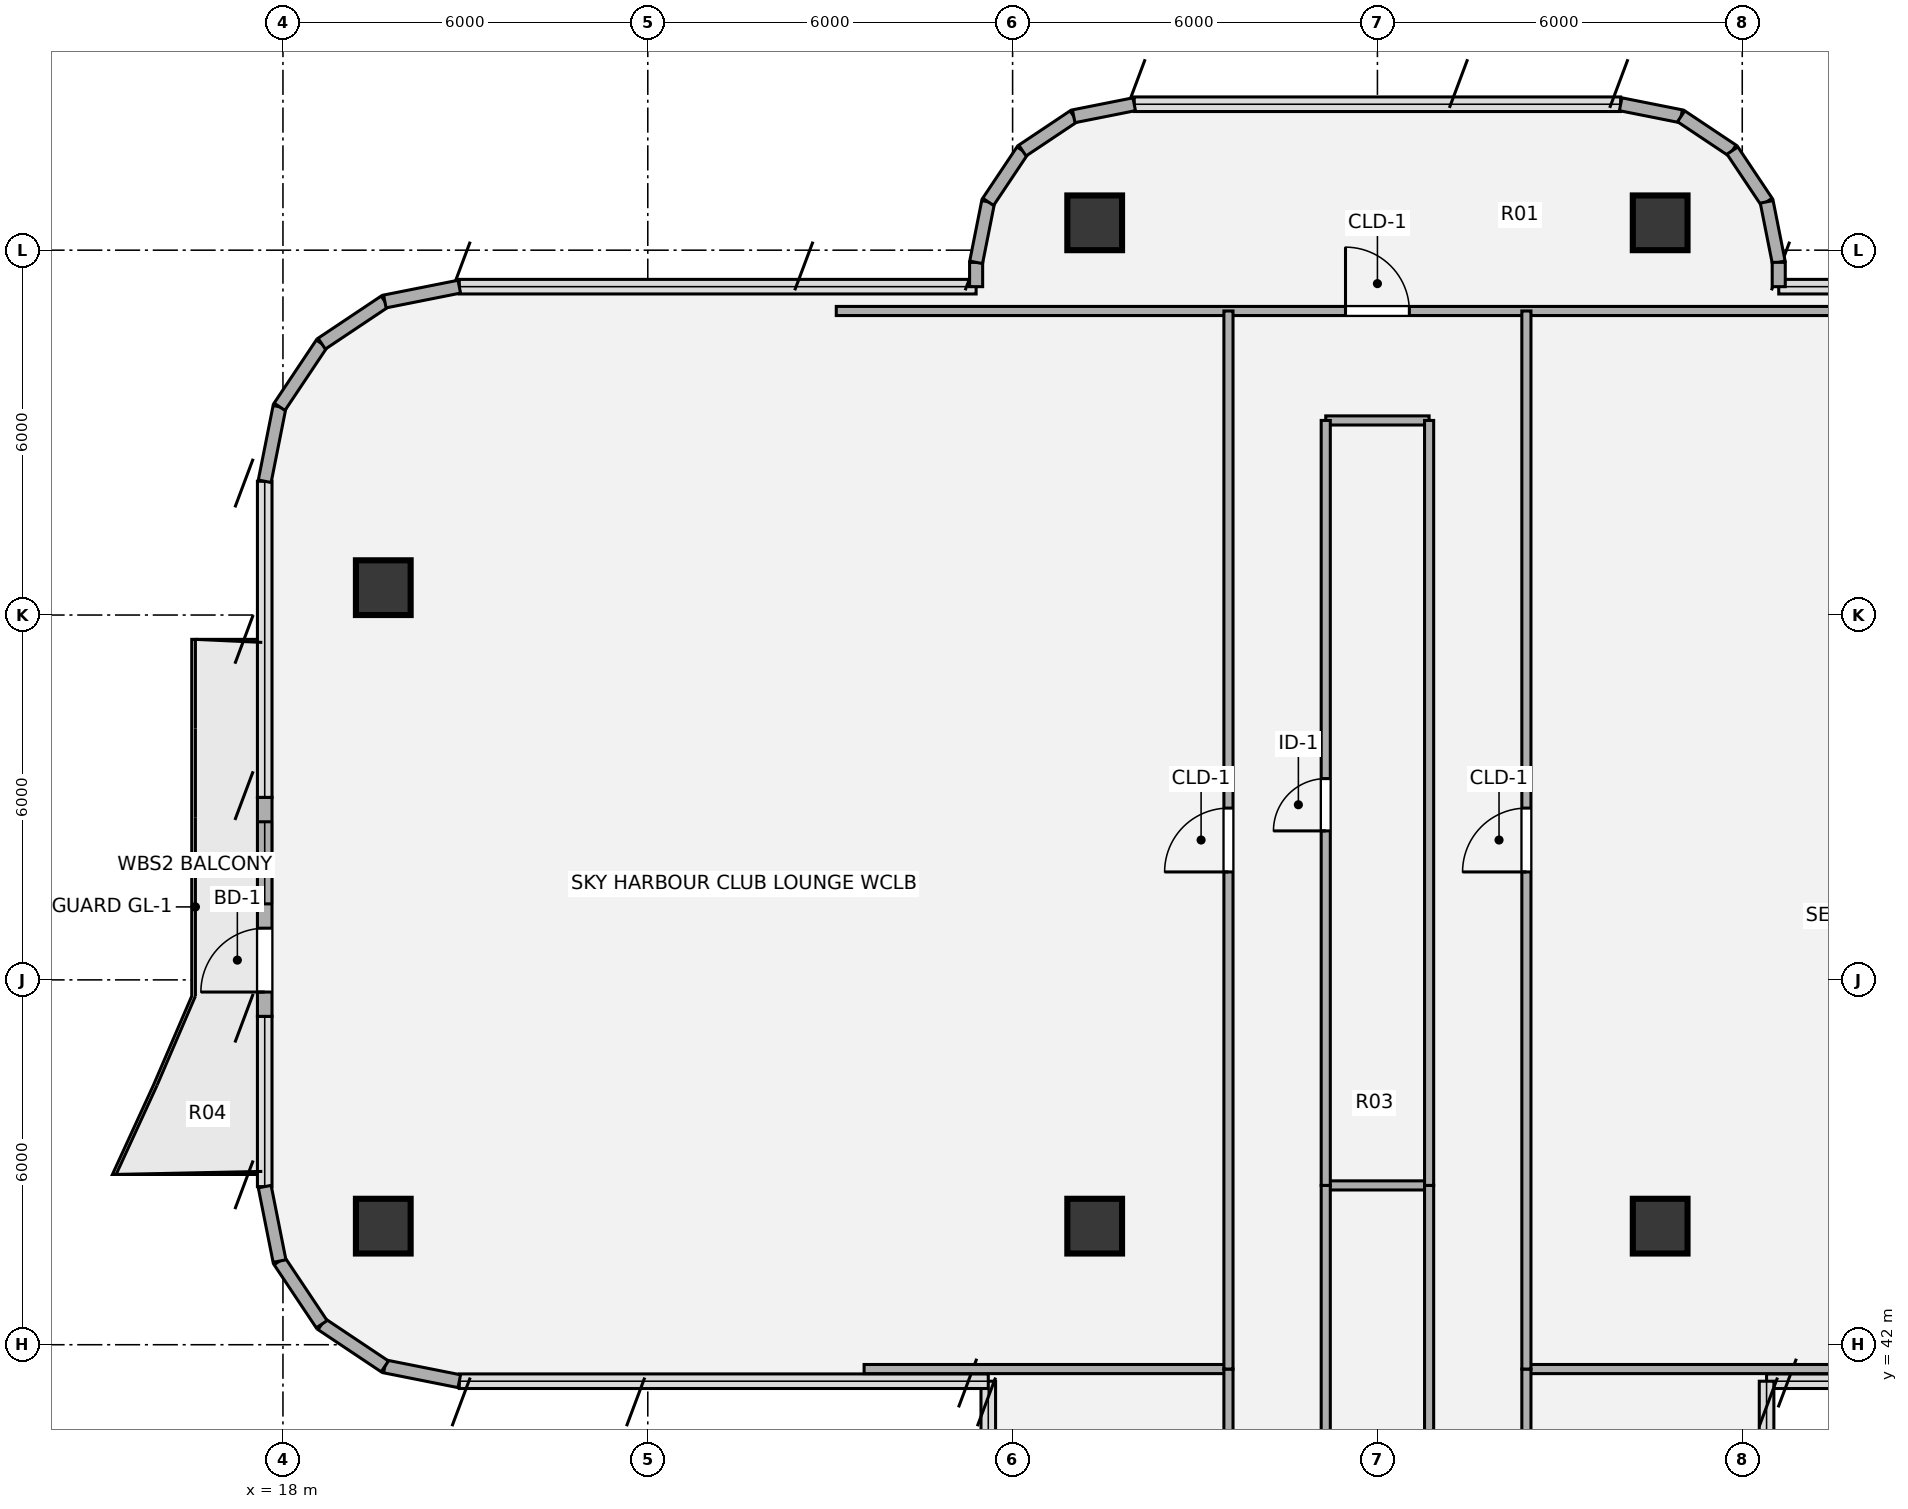
"""IFC4 building model, lengths in metres.
Left out: names, types, materials, properties, quantities, classifications, styles, units other than length and angle.
Written with IfcOpenShell. Run it as: python <this file> out.ifc"""

import sys

from ifc_helpers import new_model, si_unit, direction, frame, frame_2d, origin, origin_2d, place, context, subcontext, project, spatial, rectangle, hollow_circle, extrude, source, transform, mapped, element, fill, save


model = new_model("IFC4")
c1 = context("Model", 3, precision=1e-05, world=origin(), true_north=direction((0.0, 1.0)))
c2 = subcontext(c1, "Body", "Model", "MODEL_VIEW")
j1 = project(units=[si_unit("LENGTHUNIT", "METRE"), si_unit("PLANEANGLEUNIT", "RADIAN")], contexts=[c1])
p1 = place(None, origin())
s1 = spatial("IfcSite", under=j1, at=p1, CompositionType="ELEMENT")
p2 = place(p1, origin())
s2 = spatial("IfcBuilding", under=s1, at=p2, CompositionType="ELEMENT")
p3 = place(p2, frame((0.0, 0.0, 257.04)))
s3 = spatial("IfcBuildingStorey", under=s2, at=p3, CompositionType="ELEMENT", Elevation=257.04)
m1 = source(origin(), c2, "Body", "SweptSolid", [
    extrude(hollow_circle(Radius=0.45, WallThickness=0.032, at=origin_2d()), origin(), (0.0, 0.0, 1.0), 3.78),
])
for number, where, z_axis, x_axis in (
    (1, (19.65, 43.95, 0.0), (0.0, 0.0, 1.0), (1.0, 0.0, 0.0)),
    (2, (19.65, 54.45, 0.0), (0.0, 0.0, 1.0), (1.0, 0.0, 0.0)),
    (3, (31.35, 43.95, 0.0), (0.0, 0.0, 1.0), (1.0, 0.0, 0.0)),
    (4, (40.65, 43.95, 0.0), (0.0, 0.0, 1.0), (1.0, 0.0, 0.0)),
    (5, (31.35, 60.45, 0.0), (0.0, 0.0, 1.0), (1.0, 0.0, 0.0)),
    (6, (40.65, 60.45, 0.0), (0.0, 0.0, 1.0), (1.0, 0.0, 0.0)),
):
    element("IfcColumn", number, at=place(p3, frame(where, z_axis=z_axis, x_axis=x_axis)), inside=s3, PredefinedType="COLUMN", context=c2, shape_type="MappedRepresentation", body=[
        mapped(m1, transform((0.0, 0.0, 0.0), x_axis=(1.0, 0.0, 0.0), y_axis=(0.0, 1.0, 0.0), z_axis=(0.0, 0.0, 1.0), scale=1.0)),
    ])
for number, where, z_axis, x_axis in (
    (7, (20.9, 41.4, 0.0), (0.0, 0.0, 1.0), (-0.981, 0.195, 0.0)),
    (8, (19.675, 41.644, 0.0), (0.0, 0.0, 1.0), (-0.831, 0.556, 0.0)),
    (9, (18.637, 42.337, 0.0), (0.0, 0.0, 1.0), (-0.556, 0.831, 0.0)),
    (10, (17.944, 43.375, 0.0), (0.0, 0.0, 1.0), (-0.195, 0.981, 0.0)),
):
    element("IfcWall", number, at=place(p3, frame(where, z_axis=z_axis, x_axis=x_axis)), inside=s3, PredefinedType="SOLIDWALL", context=c2, shape_type="SweptSolid", body=[
        extrude(rectangle(XDim=1.249, YDim=0.215, at=frame_2d((0.624, 0.0))), origin(), (0.0, 0.0, 1.0), 3.53),
    ])
p4 = place(p3, frame((17.7, 47.4, 0.0), z_axis=(0.0, 0.0, 1.0), x_axis=(0.0, 1.0, 0.0)))
e11 = element("IfcWall", 11, at=p4, inside=s3, PredefinedType="SOLIDWALL", context=c2, shape_type="SweptSolid", body=[
    extrude(rectangle(XDim=3.6, YDim=0.24, at=frame_2d((1.8, 0.0))), origin(), (0.0, 0.0, 1.0), 3.53),
])
p5 = place(p4, frame((0.4, 0.0, 0.0)))
e12 = element("IfcOpeningElement", 12, at=p5, cuts=e11, PredefinedType="OPENING", context=c2, shape_type="SweptSolid", body=[
    extrude(rectangle(XDim=1.05, YDim=2.15, at=origin_2d()), frame((0.525, 0.13, 1.075), z_axis=(0.0, -1.0, 0.0), x_axis=(1.0, 0.0, 0.0)), (0.0, 0.0, 1.0), 0.26),
])
p6 = place(p4, frame((1.85, 0.0, 0.85)))
e13 = element("IfcOpeningElement", 13, at=p6, cuts=e11, PredefinedType="OPENING", context=c2, shape_type="SweptSolid", body=[
    extrude(rectangle(XDim=1.35, YDim=1.35, at=origin_2d()), frame((0.675, 0.13, 0.675), z_axis=(0.0, -1.0, 0.0), x_axis=(1.0, 0.0, 0.0)), (0.0, 0.0, 1.0), 0.26),
])
for number, where, z_axis, x_axis in (
    (14, (17.7, 56.2, 0.0), (0.0, 0.0, 1.0), (0.195, 0.981, 0.0)),
    (15, (17.944, 57.425, 0.0), (0.0, 0.0, 1.0), (0.556, 0.831, 0.0)),
    (16, (18.637, 58.463, 0.0), (0.0, 0.0, 1.0), (0.831, 0.556, 0.0)),
    (17, (19.675, 59.156, 0.0), (0.0, 0.0, 1.0), (0.981, 0.195, 0.0)),
):
    element("IfcWall", number, at=place(p3, frame(where, z_axis=z_axis, x_axis=x_axis)), inside=s3, PredefinedType="SOLIDWALL", context=c2, shape_type="SweptSolid", body=[
        extrude(rectangle(XDim=1.249, YDim=0.215, at=frame_2d((0.624, 0.0))), origin(), (0.0, 0.0, 1.0), 3.53),
    ])
p7 = place(p3, frame((29.4, 59.4, 0.0), z_axis=(0.0, 0.0, 1.0), x_axis=(0.0, 1.0, 0.0)))
e18 = element("IfcWall", 18, at=p7, inside=s3, PredefinedType="SOLIDWALL", context=c2, shape_type="SweptSolid", body=[
    extrude(rectangle(XDim=0.4, YDim=0.215, at=frame_2d((0.2, 0.0))), origin(), (0.0, 0.0, 1.0), 3.53),
])
p8 = place(p3, frame((29.4, 59.8, 0.0), z_axis=(0.0, 0.0, 1.0), x_axis=(0.195190360752, 0.980765376158, 0.0)))
e19 = element("IfcWall", 19, at=p8, inside=s3, PredefinedType="SOLIDWALL", context=c2, shape_type="SweptSolid", body=[
    extrude(rectangle(XDim=1.014, YDim=0.215, at=frame_2d((0.507, 0.0))), origin(), (0.0, 0.0, 1.0), 3.53),
])
p9 = place(p3, frame((29.598, 60.795, 0.0), z_axis=(0.0, 0.0, 1.0), x_axis=(0.555643898837, 0.831420385657, 0.0)))
e20 = element("IfcWall", 20, at=p9, inside=s3, PredefinedType="SOLIDWALL", context=c2, shape_type="SweptSolid", body=[
    extrude(rectangle(XDim=1.015, YDim=0.215, at=frame_2d((0.507, 0.0))), origin(), (0.0, 0.0, 1.0), 3.53),
])
p10 = place(p3, frame((30.162, 61.638, 0.0), z_axis=(0.0, 0.0, 1.0), x_axis=(0.831346067305, 0.555755086685, 0.0)))
e21 = element("IfcWall", 21, at=p10, inside=s3, PredefinedType="SOLIDWALL", context=c2, shape_type="SweptSolid", body=[
    extrude(rectangle(XDim=1.014, YDim=0.215, at=frame_2d((0.507, 0.0))), origin(), (0.0, 0.0, 1.0), 3.53),
])
for number, where, z_axis, x_axis in (
    (22, (31.005, 62.202, 0.0), (0.0, 0.0, 1.0), (0.981, 0.195, 0.0)),
    (23, (40.0, 62.4, 0.0), (0.0, 0.0, 1.0), (0.981, -0.195, 0.0)),
):
    element("IfcWall", number, at=place(p3, frame(where, z_axis=z_axis, x_axis=x_axis)), inside=s3, PredefinedType="SOLIDWALL", context=c2, shape_type="SweptSolid", body=[
        extrude(rectangle(XDim=1.015, YDim=0.215, at=frame_2d((0.507, 0.0))), origin(), (0.0, 0.0, 1.0), 3.53),
    ])
p11 = place(p3, frame((40.995, 62.202, 0.0), z_axis=(0.0, 0.0, 1.0), x_axis=(0.831346067305, -0.555755086685, 0.0)))
e24 = element("IfcWall", 24, at=p11, inside=s3, PredefinedType="SOLIDWALL", context=c2, shape_type="SweptSolid", body=[
    extrude(rectangle(XDim=1.014, YDim=0.215, at=frame_2d((0.507, 0.0))), origin(), (0.0, 0.0, 1.0), 3.53),
])
p12 = place(p3, frame((41.838, 61.638, 0.0), z_axis=(0.0, 0.0, 1.0), x_axis=(0.555643898837, -0.831420385657, 0.0)))
e25 = element("IfcWall", 25, at=p12, inside=s3, PredefinedType="SOLIDWALL", context=c2, shape_type="SweptSolid", body=[
    extrude(rectangle(XDim=1.015, YDim=0.215, at=frame_2d((0.507, 0.0))), origin(), (0.0, 0.0, 1.0), 3.53),
])
p13 = place(p3, frame((42.402, 60.795, 0.0), z_axis=(0.0, 0.0, 1.0), x_axis=(0.195190360752, -0.980765376158, 0.0)))
e26 = element("IfcWall", 26, at=p13, inside=s3, PredefinedType="SOLIDWALL", context=c2, shape_type="SweptSolid", body=[
    extrude(rectangle(XDim=1.014, YDim=0.215, at=frame_2d((0.507, 0.0))), origin(), (0.0, 0.0, 1.0), 3.53),
])
p14 = place(p3, frame((42.6, 59.8, 0.0), z_axis=(0.0, 0.0, 1.0), x_axis=(0.0, -1.0, 0.0)))
e27 = element("IfcWall", 27, at=p14, inside=s3, PredefinedType="SOLIDWALL", context=c2, shape_type="SweptSolid", body=[
    extrude(rectangle(XDim=0.4, YDim=0.215, at=frame_2d((0.2, 0.0))), origin(), (0.0, 0.0, 1.0), 3.53),
])
p15 = place(p3, frame((27.558, 41.6, 0.0), z_axis=(0.0, 0.0, 1.0), x_axis=(1.0, 0.0, 0.0)))
e28 = element("IfcWall", 28, at=p15, inside=s3, PredefinedType="PARTITIONING", context=c2, shape_type="SweptSolid", body=[
    extrude(rectangle(XDim=5.992, YDim=0.15, at=frame_2d((2.996, 0.0))), origin(), (0.0, 0.0, 1.0), 3.5),
])
p16 = place(p3, frame((38.45, 41.6, 0.0), z_axis=(0.0, 0.0, 1.0), x_axis=(1.0, 0.0, 0.0)))
e29 = element("IfcWall", 29, at=p16, inside=s3, PredefinedType="PARTITIONING", context=c2, shape_type="SweptSolid", body=[
    extrude(rectangle(XDim=5.993, YDim=0.15, at=frame_2d((2.997, 0.0))), origin(), (0.0, 0.0, 1.0), 3.5),
])
p17 = place(p3, frame((35.15, 44.62, 0.0), z_axis=(0.0, 0.0, 1.0), x_axis=(1.0, 0.0, 0.0)))
e30 = element("IfcWall", 30, at=p17, inside=s3, PredefinedType="PARTITIONING", context=c2, shape_type="SweptSolid", body=[
    extrude(rectangle(XDim=1.7, YDim=0.15, at=frame_2d((0.85, 0.0))), origin(), (0.0, 0.0, 1.0), 3.259),
])
p18 = place(p3, frame((35.15, 57.2, 0.0), z_axis=(0.0, 0.0, 1.0), x_axis=(1.0, 0.0, 0.0)))
e31 = element("IfcWall", 31, at=p18, inside=s3, PredefinedType="PARTITIONING", context=c2, shape_type="SweptSolid", body=[
    extrude(rectangle(XDim=1.7, YDim=0.15, at=frame_2d((0.85, 0.0))), origin(), (0.0, 0.0, 1.0), 3.308),
])
p19 = place(p3, frame((27.1, 59.0, 0.0), z_axis=(0.0, 0.0, 1.0), x_axis=(1.0, 0.0, 0.0)))
e32 = element("IfcWall", 32, at=p19, inside=s3, PredefinedType="PARTITIONING", context=c2, shape_type="SweptSolid", body=[
    extrude(rectangle(XDim=17.8, YDim=0.15, at=frame_2d((8.9, 0.0))), origin(), (0.0, 0.0, 1.0), 3.308),
])
p20 = place(p19, frame((8.375, 0.0, 0.0)))
e33 = element("IfcOpeningElement", 33, at=p20, cuts=e32, PredefinedType="OPENING", context=c2, shape_type="SweptSolid", body=[
    extrude(rectangle(XDim=1.05, YDim=2.1, at=origin_2d()), frame((0.525, 0.085, 1.05), z_axis=(0.0, -1.0, 0.0), x_axis=(1.0, 0.0, 0.0)), (0.0, 0.0, 1.0), 0.17),
])
p21 = place(p3, frame((33.55, 22.8, 0.0), z_axis=(0.0, 0.0, 1.0), x_axis=(0.0, 1.0, 0.0)))
e34 = element("IfcWall", 34, at=p21, inside=s3, PredefinedType="PARTITIONING", context=c2, shape_type="SweptSolid", body=[
    extrude(rectangle(XDim=18.8, YDim=0.15, at=frame_2d((9.4, 0.0))), origin(), (0.0, 0.0, 1.0), 3.5),
])
p22 = place(p21, frame((8.84, 0.0, 0.0)))
e35 = element("IfcOpeningElement", 35, at=p22, cuts=e34, PredefinedType="OPENING", context=c2, shape_type="SweptSolid", body=[
    extrude(rectangle(XDim=0.86, YDim=2.1, at=origin_2d()), frame((0.43, 0.085, 1.05), z_axis=(0.0, -1.0, 0.0), x_axis=(1.0, 0.0, 0.0)), (0.0, 0.0, 1.0), 0.17),
])
p23 = place(p3, frame((33.55, 41.6, 0.0), z_axis=(0.0, 0.0, 1.0), x_axis=(0.0, 1.0, 0.0)))
e36 = element("IfcWall", 36, at=p23, inside=s3, PredefinedType="PARTITIONING", context=c2, shape_type="SweptSolid", body=[
    extrude(rectangle(XDim=17.4, YDim=0.15, at=frame_2d((8.7, 0.0))), origin(), (0.0, 0.0, 1.0), 3.5),
])
p24 = place(p23, frame((8.175, 0.0, 0.0)))
e37 = element("IfcOpeningElement", 37, at=p24, cuts=e36, PredefinedType="OPENING", context=c2, shape_type="SweptSolid", body=[
    extrude(rectangle(XDim=1.05, YDim=2.1, at=origin_2d()), frame((0.525, 0.085, 1.05), z_axis=(0.0, -1.0, 0.0), x_axis=(1.0, 0.0, 0.0)), (0.0, 0.0, 1.0), 0.17),
])
p25 = place(p3, frame((35.15, 25.2, 0.0), z_axis=(0.0, 0.0, 1.0), x_axis=(0.0, 1.0, 0.0)))
e38 = element("IfcWall", 38, at=p25, inside=s3, PredefinedType="PARTITIONING", context=c2, shape_type="SweptSolid", body=[
    extrude(rectangle(XDim=19.42, YDim=0.15, at=frame_2d((9.71, 0.0))), origin(), (0.0, 0.0, 1.0), 3.5),
])
p26 = place(p3, frame((35.15, 44.62, 0.0), z_axis=(0.0, 0.0, 1.0), x_axis=(0.0, 1.0, 0.0)))
e39 = element("IfcWall", 39, at=p26, inside=s3, PredefinedType="PARTITIONING", context=c2, shape_type="SweptSolid", body=[
    extrude(rectangle(XDim=12.58, YDim=0.15, at=frame_2d((6.29, 0.0))), origin(), (0.0, 0.0, 1.0), 3.5),
])
p27 = place(p26, frame((5.83, 0.0, 0.0)))
e40 = element("IfcOpeningElement", 40, at=p27, cuts=e39, PredefinedType="OPENING", context=c2, shape_type="SweptSolid", body=[
    extrude(rectangle(XDim=0.86, YDim=2.1, at=origin_2d()), frame((0.43, 0.085, 1.05), z_axis=(0.0, -1.0, 0.0), x_axis=(1.0, 0.0, 0.0)), (0.0, 0.0, 1.0), 0.17),
])
p28 = place(p3, frame((36.85, 25.2, 0.0), z_axis=(0.0, 0.0, 1.0), x_axis=(0.0, 1.0, 0.0)))
e41 = element("IfcWall", 41, at=p28, inside=s3, PredefinedType="PARTITIONING", context=c2, shape_type="SweptSolid", body=[
    extrude(rectangle(XDim=19.42, YDim=0.15, at=frame_2d((9.71, 0.0))), origin(), (0.0, 0.0, 1.0), 3.5),
])
p29 = place(p28, frame((9.185, 0.0, 0.0)))
e42 = element("IfcOpeningElement", 42, at=p29, cuts=e41, PredefinedType="OPENING", context=c2, shape_type="SweptSolid", body=[
    extrude(rectangle(XDim=1.05, YDim=2.1, at=origin_2d()), frame((0.525, 0.085, 1.05), z_axis=(0.0, -1.0, 0.0), x_axis=(1.0, 0.0, 0.0)), (0.0, 0.0, 1.0), 0.17),
])
p30 = place(p3, frame((36.85, 44.62, 0.0), z_axis=(0.0, 0.0, 1.0), x_axis=(0.0, 1.0, 0.0)))
e43 = element("IfcWall", 43, at=p30, inside=s3, PredefinedType="PARTITIONING", context=c2, shape_type="SweptSolid", body=[
    extrude(rectangle(XDim=12.58, YDim=0.15, at=frame_2d((6.29, 0.0))), origin(), (0.0, 0.0, 1.0), 3.5),
])
p31 = place(p3, frame((38.45, 21.2, 0.0), z_axis=(0.0, 0.0, 1.0), x_axis=(0.0, 1.0, 0.0)))
e44 = element("IfcWall", 44, at=p31, inside=s3, PredefinedType="PARTITIONING", context=c2, shape_type="SweptSolid", body=[
    extrude(rectangle(XDim=20.4, YDim=0.15, at=frame_2d((10.2, 0.0))), origin(), (0.0, 0.0, 1.0), 3.5),
])
p32 = place(p31, frame((9.575, 0.0, 0.0)))
e45 = element("IfcOpeningElement", 45, at=p32, cuts=e44, PredefinedType="OPENING", context=c2, shape_type="SweptSolid", body=[
    extrude(rectangle(XDim=1.05, YDim=2.1, at=origin_2d()), frame((0.525, 0.085, 1.05), z_axis=(0.0, -1.0, 0.0), x_axis=(1.0, 0.0, 0.0)), (0.0, 0.0, 1.0), 0.17),
])
p33 = place(p3, frame((38.45, 41.6, 0.0), z_axis=(0.0, 0.0, 1.0), x_axis=(0.0, 1.0, 0.0)))
e46 = element("IfcWall", 46, at=p33, inside=s3, PredefinedType="PARTITIONING", context=c2, shape_type="SweptSolid", body=[
    extrude(rectangle(XDim=17.4, YDim=0.15, at=frame_2d((8.7, 0.0))), origin(), (0.0, 0.0, 1.0), 3.5),
])
p34 = place(p33, frame((8.175, 0.0, 0.0)))
e47 = element("IfcOpeningElement", 47, at=p34, cuts=e46, PredefinedType="OPENING", context=c2, shape_type="SweptSolid", body=[
    extrude(rectangle(XDim=1.05, YDim=2.1, at=origin_2d()), frame((0.525, 0.085, 1.05), z_axis=(0.0, -1.0, 0.0), x_axis=(1.0, 0.0, 0.0)), (0.0, 0.0, 1.0), 0.17),
])
m2 = source(origin(), c2, "Body", "SweptSolid", [
    extrude(rectangle(XDim=1.05, YDim=2.15, at=origin_2d()), frame((0.525, 0.025, 1.075), z_axis=(0.0, -1.0, 0.0), x_axis=(1.0, 0.0, 0.0)), (0.0, 0.0, 1.0), 0.05),
])
p35 = place(p5, origin())
e48 = element("IfcDoor", 48, at=p35, inside=s3, OperationType="SINGLE_SWING_LEFT", PredefinedType="DOOR", context=c2, shape_type="MappedRepresentation", body=[
    mapped(m2, transform((0.0, 0.0, 0.0), x_axis=(1.0, 0.0, 0.0), y_axis=(0.0, 1.0, 0.0), z_axis=(0.0, 0.0, 1.0), scale=1.0)),
])
fill(e12, e48)
m3 = source(origin(), c2, "Body", "SweptSolid", [
    extrude(rectangle(XDim=1.35, YDim=1.35, at=origin_2d()), frame((0.675, 0.03, 0.675), z_axis=(0.0, -1.0, 0.0), x_axis=(1.0, 0.0, 0.0)), (0.0, 0.0, 1.0), 0.06),
])
p36 = place(p6, origin())
e49 = element("IfcWindow", 49, at=p36, inside=s3, PartitioningType="SINGLE_PANEL", PredefinedType="WINDOW", context=c2, shape_type="MappedRepresentation", body=[
    mapped(m3, transform((0.0, 0.0, 0.0), x_axis=(1.0, 0.0, 0.0), y_axis=(0.0, 1.0, 0.0), z_axis=(0.0, 0.0, 1.0), scale=1.0)),
])
fill(e13, e49)
m4 = source(origin(), c2, "Body", "SweptSolid", [
    extrude(rectangle(XDim=1.05, YDim=2.1, at=origin_2d()), frame((0.525, 0.025, 1.05), z_axis=(0.0, -1.0, 0.0), x_axis=(1.0, 0.0, 0.0)), (0.0, 0.0, 1.0), 0.05),
])
p37 = place(p20, origin())
e50 = element("IfcDoor", 50, at=p37, inside=s3, OperationType="SINGLE_SWING_LEFT", PredefinedType="DOOR", context=c2, shape_type="MappedRepresentation", body=[
    mapped(m4, transform((0.0, 0.0, 0.0), x_axis=(1.0, 0.0, 0.0), y_axis=(0.0, 1.0, 0.0), z_axis=(0.0, 0.0, 1.0), scale=1.0)),
])
fill(e33, e50)
p38 = place(p24, origin())
e51 = element("IfcDoor", 51, at=p38, inside=s3, OperationType="SINGLE_SWING_LEFT", PredefinedType="DOOR", context=c2, shape_type="MappedRepresentation", body=[
    mapped(m4, transform((0.0, 0.0, 0.0), x_axis=(1.0, 0.0, 0.0), y_axis=(0.0, 1.0, 0.0), z_axis=(0.0, 0.0, 1.0), scale=1.0)),
])
fill(e37, e51)
m5 = source(origin(), c2, "Body", "SweptSolid", [
    extrude(rectangle(XDim=0.86, YDim=2.1, at=origin_2d()), frame((0.43, 0.025, 1.05), z_axis=(0.0, -1.0, 0.0), x_axis=(1.0, 0.0, 0.0)), (0.0, 0.0, 1.0), 0.05),
])
p39 = place(p27, origin())
e52 = element("IfcDoor", 52, at=p39, inside=s3, OperationType="SINGLE_SWING_LEFT", PredefinedType="DOOR", context=c2, shape_type="MappedRepresentation", body=[
    mapped(m5, transform((0.0, 0.0, 0.0), x_axis=(1.0, 0.0, 0.0), y_axis=(0.0, 1.0, 0.0), z_axis=(0.0, 0.0, 1.0), scale=1.0)),
])
fill(e40, e52)
p40 = place(p34, origin())
e53 = element("IfcDoor", 53, at=p40, inside=s3, OperationType="SINGLE_SWING_LEFT", PredefinedType="DOOR", context=c2, shape_type="MappedRepresentation", body=[
    mapped(m4, transform((0.0, 0.0, 0.0), x_axis=(1.0, 0.0, 0.0), y_axis=(0.0, 1.0, 0.0), z_axis=(0.0, 0.0, 1.0), scale=1.0)),
])
fill(e47, e53)
save(model, sys.argv[1])
